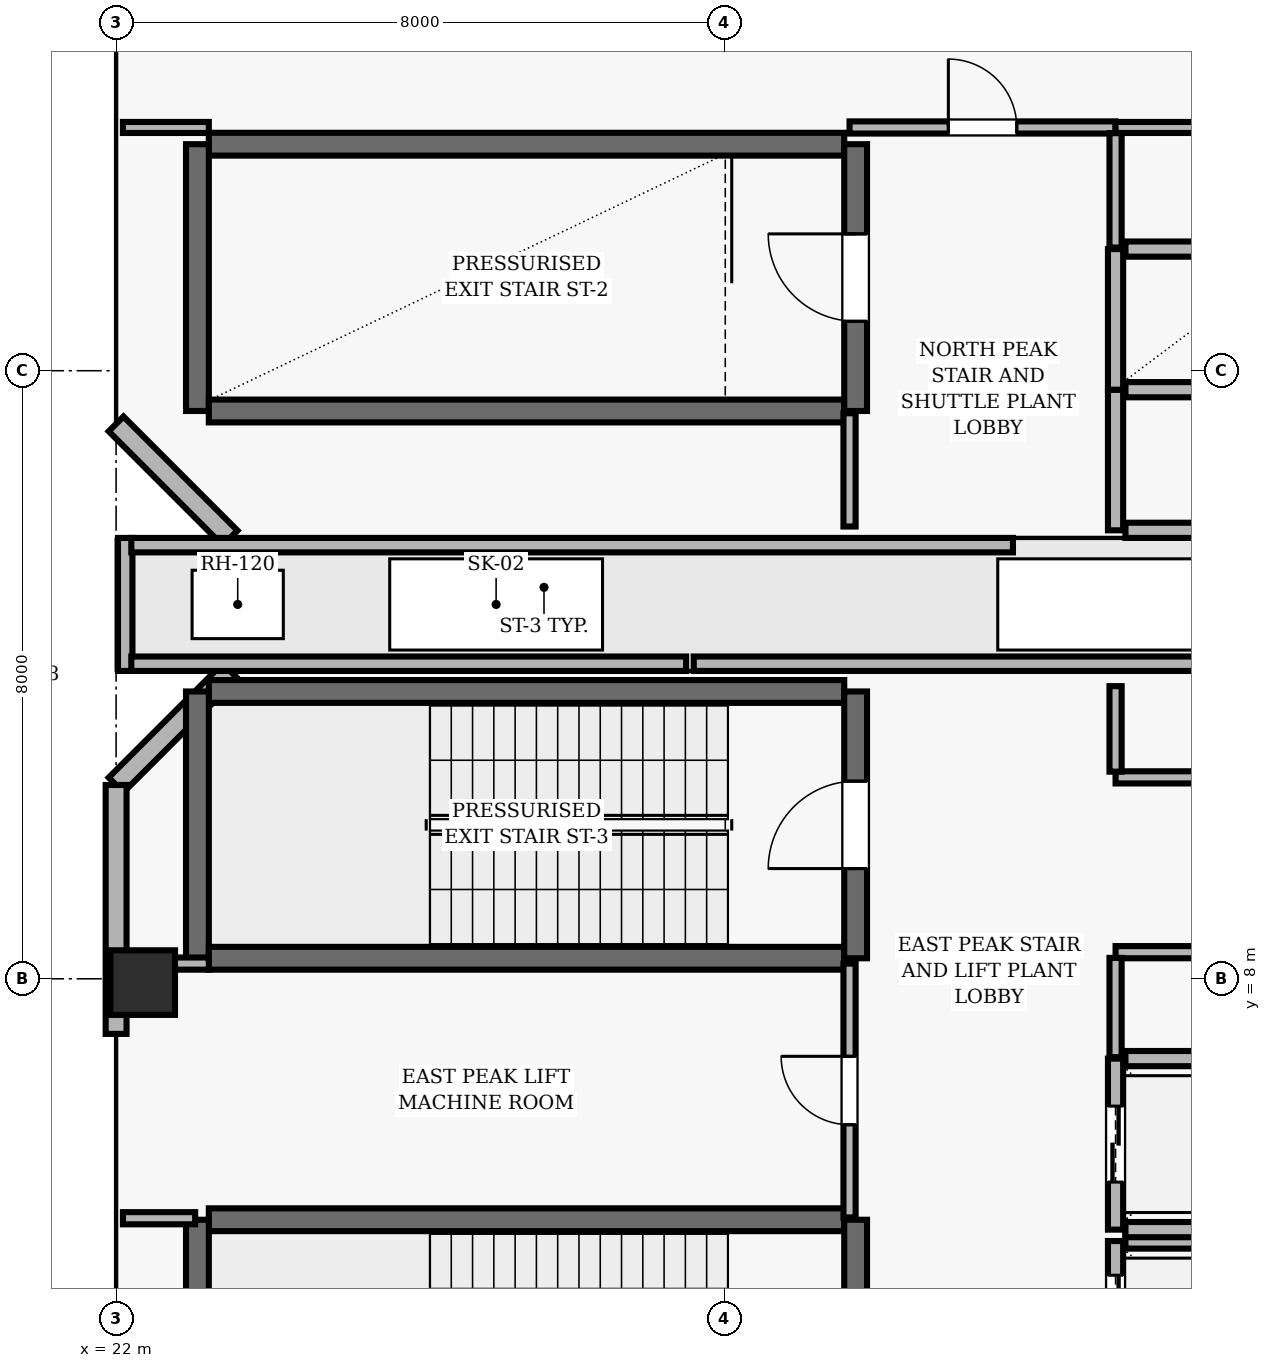
"""IFC4 building model, lengths in metres.
Left out: names, types, materials, properties, quantities, classifications, styles, units other than length and angle.
Written with IfcOpenShell. Run it as: python <this file> out.ifc"""

import sys

from ifc_helpers import new_model, si_unit, direction, frame, frame_2d, origin, origin_2d, place, context, subcontext, project, spatial, rectangle, extrude, element, fill, save


model = new_model("IFC4")
c1 = context("Model", 3, precision=1e-05, world=origin(), true_north=direction((0.0, 1.0)))
c2 = subcontext(c1, "Body", "Model", "MODEL_VIEW")
j1 = project(units=[si_unit("LENGTHUNIT", "METRE"), si_unit("PLANEANGLEUNIT", "RADIAN")], contexts=[c1])
p1 = place(None, origin())
s1 = spatial("IfcSite", under=j1, at=p1, CompositionType="ELEMENT")
p2 = place(p1, origin())
s2 = spatial("IfcBuilding", under=s1, at=p2, CompositionType="ELEMENT")
p3 = place(p2, frame((0.0, 0.0, 316.7)))
s3 = spatial("IfcBuildingStorey", under=s2, at=p3, CompositionType="ELEMENT", Elevation=316.7)
p4 = place(p3, frame((22.35, 7.95, 0.0), z_axis=(0.0, 0.0, 1.0), x_axis=(1.0, 0.0, 0.0)))
e1 = element("IfcColumn", 1, at=p4, inside=s3, PredefinedType="COLUMN", context=c2, shape_type="SweptSolid", body=[
    extrude(rectangle(XDim=0.85, YDim=0.85, at=origin_2d()), origin(), (0.0, 0.0, 1.0), 5.0),
])
p5 = place(p3, frame((23.5, 12.05, 0.0), z_axis=(0.0, 0.0, 1.0), x_axis=(-0.707106781187, -0.707106781187, 0.0)))
e2 = element("IfcWall", 2, at=p5, inside=s3, PredefinedType="SOLIDWALL", context=c2, shape_type="SweptSolid", body=[
    extrude(rectangle(XDim=2.121, YDim=0.275, at=frame_2d((1.061, 0.0))), origin(), (0.0, 0.0, 1.0), 4.74),
])
p6 = place(p3, frame((22.0, 10.55, 0.0), z_axis=(0.0, 0.0, 1.0), x_axis=(0.0, -1.0, 0.0)))
e3 = element("IfcWall", 3, at=p6, inside=s3, PredefinedType="SOLIDWALL", context=c2, shape_type="SweptSolid", body=[
    extrude(rectangle(XDim=3.275, YDim=0.275, at=frame_2d((1.638, 0.0))), origin(), (0.0, 0.0, 1.0), 4.74),
])
p7 = place(p3, frame((22.0, 15.3, 0.0), z_axis=(0.0, 0.0, 1.0), x_axis=(0.707106781187, -0.707106781187, 0.0)))
e4 = element("IfcWall", 4, at=p7, inside=s3, PredefinedType="SOLIDWALL", context=c2, shape_type="SweptSolid", body=[
    extrude(rectangle(XDim=2.121, YDim=0.275, at=frame_2d((1.061, 0.0))), origin(), (0.0, 0.0, 1.0), 4.74),
])
p8 = place(p3, frame((22.12, 12.05, 0.0), z_axis=(0.0, 0.0, 1.0), x_axis=(0.0, 1.0, 0.0)))
e5 = element("IfcWall", 5, at=p8, inside=s3, PredefinedType="PARAPET", context=c2, shape_type="SweptSolid", body=[
    extrude(rectangle(XDim=1.75, YDim=0.19, at=frame_2d((0.875, 0.0))), origin(), (0.0, 0.0, 1.0), 1.3),
])
p9 = place(p3, frame((22.2, 12.145, 0.0), z_axis=(0.0, 0.0, 1.0), x_axis=(1.0, 0.0, 0.0)))
e6 = element("IfcWall", 6, at=p9, inside=s3, PredefinedType="PARAPET", context=c2, shape_type="SweptSolid", body=[
    extrude(rectangle(XDim=7.3, YDim=0.19, at=frame_2d((3.65, 0.0))), origin(), (0.0, 0.0, 1.0), 1.2),
])
p10 = place(p3, frame((29.6, 12.145, 0.0), z_axis=(0.0, 0.0, 1.0), x_axis=(1.0, 0.0, 0.0)))
e7 = element("IfcWall", 7, at=p10, inside=s3, PredefinedType="PARAPET", context=c2, shape_type="SweptSolid", body=[
    extrude(rectangle(XDim=7.9, YDim=0.19, at=frame_2d((3.95, 0.0))), origin(), (0.0, 0.0, 1.0), 1.2),
])
p11 = place(p3, frame((22.2, 13.705, 0.0), z_axis=(0.0, 0.0, 1.0), x_axis=(1.0, 0.0, 0.0)))
e8 = element("IfcWall", 8, at=p11, inside=s3, PredefinedType="PARAPET", context=c2, shape_type="SweptSolid", body=[
    extrude(rectangle(XDim=11.6, YDim=0.19, at=frame_2d((5.8, 0.0))), origin(), (0.0, 0.0, 1.0), 1.2),
])
p12 = place(p3, frame((31.58, 4.83, 0.0), z_axis=(0.0, 0.0, 1.0), x_axis=(-1.0, 0.0, 0.0)))
e9 = element("IfcWall", 9, at=p12, inside=s3, PredefinedType="SHEAR", context=c2, shape_type="SweptSolid", body=[
    extrude(rectangle(XDim=8.36, YDim=0.3, at=frame_2d((4.18, 0.0))), origin(), (0.0, 0.0, 1.0), 4.74),
])
p13 = place(p3, frame((23.07, 4.83, 0.0), z_axis=(0.0, 0.0, 1.0), x_axis=(0.0, -1.0, 0.0)))
e10 = element("IfcWall", 10, at=p13, inside=s3, PredefinedType="SHEAR", context=c2, shape_type="SweptSolid", body=[
    extrude(rectangle(XDim=3.51, YDim=0.3, at=frame_2d((1.755, 0.0))), origin(), (0.0, 0.0, 1.0), 4.74),
])
p14 = place(p3, frame((31.73, 0.96, 0.0), z_axis=(0.0, 0.0, 1.0), x_axis=(0.0, 1.0, 0.0)))
e11 = element("IfcWall", 11, at=p14, inside=s3, PredefinedType="SHEAR", context=c2, shape_type="SweptSolid", body=[
    extrude(rectangle(XDim=3.87, YDim=0.3, at=frame_2d((1.935, 0.0))), origin(), (0.0, 0.0, 1.0), 4.74),
])
p15 = place(p14, frame((1.54, 0.0, 0.0)))
e12 = element("IfcOpeningElement", 12, at=p15, cuts=e11, PredefinedType="OPENING", context=c2, shape_type="SweptSolid", body=[
    extrude(rectangle(XDim=1.15, YDim=2.15, at=frame_2d((0.575, 1.075))), frame((0.0, 0.16, 0.0), z_axis=(0.0, -1.0, 0.0), x_axis=(1.0, 0.0, 0.0)), (0.0, 0.0, 1.0), 0.32),
])
p16 = place(p3, frame((31.58, 18.98, 0.0), z_axis=(0.0, 0.0, 1.0), x_axis=(-1.0, 0.0, 0.0)))
e13 = element("IfcWall", 13, at=p16, inside=s3, PredefinedType="SHEAR", context=c2, shape_type="SweptSolid", body=[
    extrude(rectangle(XDim=8.36, YDim=0.3, at=frame_2d((4.18, 0.0))), origin(), (0.0, 0.0, 1.0), 4.74),
])
p17 = place(p3, frame((23.07, 18.98, 0.0), z_axis=(0.0, 0.0, 1.0), x_axis=(0.0, -1.0, 0.0)))
e14 = element("IfcWall", 14, at=p17, inside=s3, PredefinedType="SHEAR", context=c2, shape_type="SweptSolid", body=[
    extrude(rectangle(XDim=3.51, YDim=0.3, at=frame_2d((1.755, 0.0))), origin(), (0.0, 0.0, 1.0), 4.74),
])
p18 = place(p3, frame((23.22, 15.47, 0.0), z_axis=(0.0, 0.0, 1.0), x_axis=(1.0, 0.0, 0.0)))
e15 = element("IfcWall", 15, at=p18, inside=s3, PredefinedType="SHEAR", context=c2, shape_type="SweptSolid", body=[
    extrude(rectangle(XDim=8.36, YDim=0.3, at=frame_2d((4.18, 0.0))), origin(), (0.0, 0.0, 1.0), 4.74),
])
p19 = place(p3, frame((31.73, 15.47, 0.0), z_axis=(0.0, 0.0, 1.0), x_axis=(0.0, 1.0, 0.0)))
e16 = element("IfcWall", 16, at=p19, inside=s3, PredefinedType="SHEAR", context=c2, shape_type="SweptSolid", body=[
    extrude(rectangle(XDim=3.51, YDim=0.3, at=frame_2d((1.755, 0.0))), origin(), (0.0, 0.0, 1.0), 4.74),
])
p20 = place(p19, frame((1.18, 0.0, 0.0)))
e17 = element("IfcOpeningElement", 17, at=p20, cuts=e16, PredefinedType="OPENING", context=c2, shape_type="SweptSolid", body=[
    extrude(rectangle(XDim=1.15, YDim=2.15, at=frame_2d((0.575, 1.075))), frame((0.0, 0.16, 0.0), z_axis=(0.0, -1.0, 0.0), x_axis=(1.0, 0.0, 0.0)), (0.0, 0.0, 1.0), 0.32),
])
p21 = place(p3, frame((31.58, 11.78, 0.0), z_axis=(0.0, 0.0, 1.0), x_axis=(-1.0, 0.0, 0.0)))
e18 = element("IfcWall", 18, at=p21, inside=s3, PredefinedType="SHEAR", context=c2, shape_type="SweptSolid", body=[
    extrude(rectangle(XDim=8.36, YDim=0.3, at=frame_2d((4.18, 0.0))), origin(), (0.0, 0.0, 1.0), 4.74),
])
p22 = place(p3, frame((23.07, 11.78, 0.0), z_axis=(0.0, 0.0, 1.0), x_axis=(0.0, -1.0, 0.0)))
e19 = element("IfcWall", 19, at=p22, inside=s3, PredefinedType="SHEAR", context=c2, shape_type="SweptSolid", body=[
    extrude(rectangle(XDim=3.51, YDim=0.3, at=frame_2d((1.755, 0.0))), origin(), (0.0, 0.0, 1.0), 4.74),
])
p23 = place(p3, frame((23.22, 8.27, 0.0), z_axis=(0.0, 0.0, 1.0), x_axis=(1.0, 0.0, 0.0)))
e20 = element("IfcWall", 20, at=p23, inside=s3, PredefinedType="SHEAR", context=c2, shape_type="SweptSolid", body=[
    extrude(rectangle(XDim=8.36, YDim=0.3, at=frame_2d((4.18, 0.0))), origin(), (0.0, 0.0, 1.0), 4.74),
])
p24 = place(p3, frame((31.73, 8.27, 0.0), z_axis=(0.0, 0.0, 1.0), x_axis=(0.0, 1.0, 0.0)))
e21 = element("IfcWall", 21, at=p24, inside=s3, PredefinedType="SHEAR", context=c2, shape_type="SweptSolid", body=[
    extrude(rectangle(XDim=3.51, YDim=0.3, at=frame_2d((1.755, 0.0))), origin(), (0.0, 0.0, 1.0), 4.74),
])
p25 = place(p24, frame((1.18, 0.0, 0.0)))
e22 = element("IfcOpeningElement", 22, at=p25, cuts=e21, PredefinedType="OPENING", context=c2, shape_type="SweptSolid", body=[
    extrude(rectangle(XDim=1.15, YDim=2.15, at=frame_2d((0.575, 1.075))), frame((0.0, 0.16, 0.0), z_axis=(0.0, -1.0, 0.0), x_axis=(1.0, 0.0, 0.0)), (0.0, 0.0, 1.0), 0.32),
])
p26 = place(p3, frame((35.15, 4.55, 0.0), z_axis=(0.0, 0.0, 1.0), x_axis=(0.0, -1.0, 0.0)))
e23 = element("IfcWall", 23, at=p26, inside=s3, PredefinedType="SOLIDWALL", context=c2, shape_type="SweptSolid", body=[
    extrude(rectangle(XDim=2.1, YDim=0.2, at=frame_2d((1.05, 0.0))), origin(), (0.0, 0.0, 1.0), 4.74),
])
p27 = place(p26, frame((0.45, 0.0, 0.0)))
e24 = element("IfcOpeningElement", 24, at=p27, cuts=e23, PredefinedType="OPENING", context=c2, shape_type="SweptSolid", body=[
    extrude(rectangle(XDim=1.2, YDim=2.15, at=frame_2d((0.6, 1.075))), frame((0.0, 0.11, 0.0), z_axis=(0.0, -1.0, 0.0), x_axis=(1.0, 0.0, 0.0)), (0.0, 0.0, 1.0), 0.22),
])
p28 = place(p3, frame((37.42, 4.55, 0.0), z_axis=(0.0, 0.0, 1.0), x_axis=(-1.0, 0.0, 0.0)))
e25 = element("IfcWall", 25, at=p28, inside=s3, PredefinedType="SOLIDWALL", context=c2, shape_type="SweptSolid", body=[
    extrude(rectangle(XDim=2.14, YDim=0.2, at=frame_2d((1.07, 0.0))), origin(), (0.0, 0.0, 1.0), 4.74),
])
p29 = place(p3, frame((35.15, 6.95, 0.0), z_axis=(0.0, 0.0, 1.0), x_axis=(0.0, -1.0, 0.0)))
e26 = element("IfcWall", 26, at=p29, inside=s3, PredefinedType="SOLIDWALL", context=c2, shape_type="SweptSolid", body=[
    extrude(rectangle(XDim=2.25, YDim=0.2, at=frame_2d((1.125, 0.0))), origin(), (0.0, 0.0, 1.0), 4.74),
])
p30 = place(p29, frame((0.625, 0.0, 0.0)))
e27 = element("IfcOpeningElement", 27, at=p30, cuts=e26, PredefinedType="OPENING", context=c2, shape_type="SweptSolid", body=[
    extrude(rectangle(XDim=1.0, YDim=2.1, at=frame_2d((0.5, 1.05))), frame((0.0, 0.11, 0.0), z_axis=(0.0, -1.0, 0.0), x_axis=(1.0, 0.0, 0.0)), (0.0, 0.0, 1.0), 0.22),
])
for number, where, z_axis, x_axis in (
    (28, (35.28, 4.7, 0.0), (0.0, 0.0, 1.0), (1.0, 0.0, 0.0)),
    (29, (37.42, 6.95, 0.0), (0.0, 0.0, 1.0), (-1.0, 0.0, 0.0)),
):
    element("IfcWall", number, at=place(p3, frame(where, z_axis=z_axis, x_axis=x_axis)), inside=s3, PredefinedType="SOLIDWALL", context=c2, shape_type="SweptSolid", body=[
        extrude(rectangle(XDim=2.14, YDim=0.2, at=frame_2d((1.07, 0.0))), origin(), (0.0, 0.0, 1.0), 4.74),
    ])
p31 = place(p3, frame((35.15, 15.75, 0.0), z_axis=(0.0, 0.0, 1.0), x_axis=(0.0, -1.0, 0.0)))
e30 = element("IfcWall", 30, at=p31, inside=s3, PredefinedType="SOLIDWALL", context=c2, shape_type="SweptSolid", body=[
    extrude(rectangle(XDim=1.85, YDim=0.2, at=frame_2d((0.925, 0.0))), origin(), (0.0, 0.0, 1.0), 4.74),
])
for number, where, z_axis, x_axis in (
    (31, (35.28, 13.9, 0.0), (0.0, 0.0, 1.0), (1.0, 0.0, 0.0)),
    (32, (37.42, 15.75, 0.0), (0.0, 0.0, 1.0), (-1.0, 0.0, 0.0)),
):
    element("IfcWall", number, at=place(p3, frame(where, z_axis=z_axis, x_axis=x_axis)), inside=s3, PredefinedType="SOLIDWALL", context=c2, shape_type="SweptSolid", body=[
        extrude(rectangle(XDim=2.14, YDim=0.2, at=frame_2d((1.07, 0.0))), origin(), (0.0, 0.0, 1.0), 4.74),
    ])
p32 = place(p3, frame((35.15, 17.6, 0.0), z_axis=(0.0, 0.0, 1.0), x_axis=(0.0, -1.0, 0.0)))
e33 = element("IfcWall", 33, at=p32, inside=s3, PredefinedType="SOLIDWALL", context=c2, shape_type="SweptSolid", body=[
    extrude(rectangle(XDim=1.85, YDim=0.2, at=frame_2d((0.925, 0.0))), origin(), (0.0, 0.0, 1.0), 4.74),
])
p33 = place(p3, frame((37.42, 17.6, 0.0), z_axis=(0.0, 0.0, 1.0), x_axis=(-1.0, 0.0, 0.0)))
e34 = element("IfcWall", 34, at=p33, inside=s3, PredefinedType="SOLIDWALL", context=c2, shape_type="SweptSolid", body=[
    extrude(rectangle(XDim=2.14, YDim=0.2, at=frame_2d((1.07, 0.0))), origin(), (0.0, 0.0, 1.0), 4.74),
])
p34 = place(p3, frame((22.09, 4.85, 0.0), z_axis=(0.0, 0.0, 1.0), x_axis=(1.0, 0.0, 0.0)))
e35 = element("IfcWall", 35, at=p34, inside=s3, PredefinedType="PARTITIONING", context=c2, shape_type="SweptSolid", body=[
    extrude(rectangle(XDim=0.95, YDim=0.16, at=frame_2d((0.475, 0.0))), origin(), (0.0, 0.0, 1.0), 4.74),
])
p35 = place(p3, frame((22.09, 19.2, 0.0), z_axis=(0.0, 0.0, 1.0), x_axis=(1.0, 0.0, 0.0)))
e36 = element("IfcWall", 36, at=p35, inside=s3, PredefinedType="PARTITIONING", context=c2, shape_type="SweptSolid", body=[
    extrude(rectangle(XDim=1.13, YDim=0.145, at=frame_2d((0.565, 0.0))), origin(), (0.0, 0.0, 1.0), 4.74),
])
p36 = place(p3, frame((23.22, 8.2, 0.0), z_axis=(0.0, 0.0, 1.0), x_axis=(-1.0, 0.0, 0.0)))
e37 = element("IfcWall", 37, at=p36, inside=s3, PredefinedType="PARTITIONING", context=c2, shape_type="SweptSolid", body=[
    extrude(rectangle(XDim=1.087, YDim=0.16, at=frame_2d((0.543, 0.0))), origin(), (0.0, 0.0, 1.0), 4.277),
])
p37 = place(p3, frame((31.65, 19.2, 0.0), z_axis=(0.0, 0.0, 1.0), x_axis=(1.0, 0.0, 0.0)))
e38 = element("IfcWall", 38, at=p37, inside=s3, PredefinedType="PARTITIONING", context=c2, shape_type="SweptSolid", body=[
    extrude(rectangle(XDim=3.5, YDim=0.16, at=frame_2d((1.75, 0.0))), origin(), (0.0, 0.0, 1.0), 4.74),
])
p38 = place(p37, frame((1.3, 0.0, 0.0)))
e39 = element("IfcOpeningElement", 39, at=p38, cuts=e38, PredefinedType="OPENING", context=c2, shape_type="SweptSolid", body=[
    extrude(rectangle(XDim=0.9, YDim=2.1, at=frame_2d((0.45, 1.05))), frame((0.0, 0.09, 0.0), z_axis=(0.0, -1.0, 0.0), x_axis=(1.0, 0.0, 0.0)), (0.0, 0.0, 1.0), 0.18),
])
p39 = place(p3, frame((35.15, 8.35, 0.0), z_axis=(0.0, 0.0, 1.0), x_axis=(1.0, 0.0, 0.0)))
e40 = element("IfcWall", 40, at=p39, inside=s3, PredefinedType="PARTITIONING", context=c2, shape_type="SweptSolid", body=[
    extrude(rectangle(XDim=2.9, YDim=0.16, at=frame_2d((1.45, 0.0))), origin(), (0.0, 0.0, 1.0), 4.277),
])
p40 = place(p3, frame((35.15, 19.2, 0.0), z_axis=(0.0, 0.0, 1.0), x_axis=(1.0, 0.0, 0.0)))
e41 = element("IfcWall", 41, at=p40, inside=s3, PredefinedType="PARTITIONING", context=c2, shape_type="SweptSolid", body=[
    extrude(rectangle(XDim=2.76, YDim=0.145, at=frame_2d((1.38, 0.0))), origin(), (0.0, 0.0, 1.0), 4.74),
])
p41 = place(p3, frame((59.513, 10.65, 0.0), z_axis=(0.0, 0.0, 1.0), x_axis=(-1.0, 0.0, 0.0)))
e42 = element("IfcWall", 42, at=p41, inside=s3, PredefinedType="PARTITIONING", context=c2, shape_type="SweptSolid", body=[
    extrude(rectangle(XDim=24.363, YDim=0.16, at=frame_2d((12.182, 0.0))), origin(), (0.0, 0.0, 1.0), 4.74),
])
p42 = place(p3, frame((31.65, 4.86, 0.0), z_axis=(0.0, 0.0, 1.0), x_axis=(0.0, 1.0, 0.0)))
e43 = element("IfcWall", 43, at=p42, inside=s3, PredefinedType="PARTITIONING", context=c2, shape_type="SweptSolid", body=[
    extrude(rectangle(XDim=3.34, YDim=0.16, at=frame_2d((1.67, 0.0))), origin(), (0.0, 0.0, 1.0), 4.74),
])
p43 = place(p42, frame((1.22, 0.0, 0.0)))
e44 = element("IfcOpeningElement", 44, at=p43, cuts=e43, PredefinedType="OPENING", context=c2, shape_type="SweptSolid", body=[
    extrude(rectangle(XDim=0.9, YDim=2.1, at=frame_2d((0.45, 1.05))), frame((0.0, 0.09, 0.0), z_axis=(0.0, -1.0, 0.0), x_axis=(1.0, 0.0, 0.0)), (0.0, 0.0, 1.0), 0.18),
])
p44 = place(p3, frame((31.65, 15.44, 0.0), z_axis=(0.0, 0.0, 1.0), x_axis=(0.0, -1.0, 0.0)))
e45 = element("IfcWall", 45, at=p44, inside=s3, PredefinedType="PARTITIONING", context=c2, shape_type="SweptSolid", body=[
    extrude(rectangle(XDim=1.49, YDim=0.16, at=frame_2d((0.745, 0.0))), origin(), (0.0, 0.0, 1.0), 4.74),
])
p45 = place(p3, frame((35.15, 6.97, 0.0), z_axis=(0.0, 0.0, 1.0), x_axis=(0.0, 1.0, 0.0)))
e46 = element("IfcWall", 46, at=p45, inside=s3, PredefinedType="PARTITIONING", context=c2, shape_type="SweptSolid", body=[
    extrude(rectangle(XDim=1.305, YDim=0.16, at=frame_2d((0.652, 0.0))), origin(), (0.0, 0.0, 1.0), 4.74),
])
p46 = place(p3, frame((35.15, 10.725, 0.0), z_axis=(0.0, 0.0, 1.0), x_axis=(0.0, 1.0, 0.0)))
e47 = element("IfcWall", 47, at=p46, inside=s3, PredefinedType="PARTITIONING", context=c2, shape_type="SweptSolid", body=[
    extrude(rectangle(XDim=1.125, YDim=0.16, at=frame_2d((0.562, 0.0))), origin(), (0.0, 0.0, 1.0), 4.74),
])
p47 = place(p3, frame((35.15, 17.62, 0.0), z_axis=(0.0, 0.0, 1.0), x_axis=(0.0, 1.0, 0.0)))
e48 = element("IfcWall", 48, at=p47, inside=s3, PredefinedType="PARTITIONING", context=c2, shape_type="SweptSolid", body=[
    extrude(rectangle(XDim=1.505, YDim=0.16, at=frame_2d((0.752, 0.0))), origin(), (0.0, 0.0, 1.0), 4.74),
])
p48 = place(p3, frame((0.0, 0.0, -0.26)))
p49 = place(p48, frame((27.0, 12.925, 0.0)))
p50 = place(p49, frame((0.0, 0.0, 0.21)))
e49 = element("IfcWindow", 49, at=p50, inside=s3, PartitioningType="SINGLE_PANEL", PredefinedType="SKYLIGHT", context=c2, shape_type="SweptSolid", body=[
    extrude(rectangle(XDim=2.8, YDim=1.2, at=origin_2d()), origin(), (0.0, 0.0, 1.0), 0.05),
])
p51 = place(p48, frame((35.0, 12.925, 0.0)))
p52 = place(p51, frame((0.0, 0.0, 0.21)))
e50 = element("IfcWindow", 50, at=p52, inside=s3, PartitioningType="SINGLE_PANEL", PredefinedType="SKYLIGHT", context=c2, shape_type="SweptSolid", body=[
    extrude(rectangle(XDim=2.8, YDim=1.2, at=origin_2d()), origin(), (0.0, 0.0, 1.0), 0.05),
])
p53 = place(p48, frame((23.6, 12.925, 0.0)))
p54 = place(p53, frame((0.0, 0.0, 0.21)))
e51 = element("IfcDoor", 51, at=p54, inside=s3, OperationType="SINGLE_SWING_LEFT", PredefinedType="TRAPDOOR", context=c2, shape_type="SweptSolid", body=[
    extrude(rectangle(XDim=1.2, YDim=0.9, at=origin_2d()), origin(), (0.0, 0.0, 1.0), 0.05),
])
p55 = place(p20, origin())
e52 = element("IfcDoor", 52, at=p55, inside=s3, OperationType="SINGLE_SWING_RIGHT", PredefinedType="DOOR", context=c2, shape_type="SweptSolid", body=[
    extrude(rectangle(XDim=1.15, YDim=2.15, at=frame_2d((0.575, 1.075))), frame((0.0, 0.025, 0.0), z_axis=(0.0, -1.0, 0.0), x_axis=(1.0, 0.0, 0.0)), (0.0, 0.0, 1.0), 0.05),
])
fill(e17, e52)
p56 = place(p25, origin())
e53 = element("IfcDoor", 53, at=p56, inside=s3, OperationType="SINGLE_SWING_LEFT", PredefinedType="DOOR", context=c2, shape_type="SweptSolid", body=[
    extrude(rectangle(XDim=1.15, YDim=2.15, at=frame_2d((0.575, 1.075))), frame((0.0, 0.025, 0.0), z_axis=(0.0, -1.0, 0.0), x_axis=(1.0, 0.0, 0.0)), (0.0, 0.0, 1.0), 0.05),
])
fill(e22, e53)
p57 = place(p27, origin())
e54 = element("IfcDoor", 54, at=p57, inside=s3, OperationType="DOUBLE_DOOR_SLIDING", PredefinedType="DOOR", context=c2, shape_type="SweptSolid", body=[
    extrude(rectangle(XDim=1.2, YDim=2.15, at=frame_2d((0.6, 1.075))), frame((0.0, 0.025, 0.0), z_axis=(0.0, -1.0, 0.0), x_axis=(1.0, 0.0, 0.0)), (0.0, 0.0, 1.0), 0.05),
])
fill(e24, e54)
p58 = place(p30, origin())
e55 = element("IfcDoor", 55, at=p58, inside=s3, OperationType="DOUBLE_DOOR_SLIDING", PredefinedType="DOOR", context=c2, shape_type="SweptSolid", body=[
    extrude(rectangle(XDim=1.0, YDim=2.1, at=frame_2d((0.5, 1.05))), frame((0.0, 0.025, 0.0), z_axis=(0.0, -1.0, 0.0), x_axis=(1.0, 0.0, 0.0)), (0.0, 0.0, 1.0), 0.05),
])
fill(e27, e55)
p59 = place(p43, origin())
e56 = element("IfcDoor", 56, at=p59, inside=s3, OperationType="SINGLE_SWING_RIGHT", PredefinedType="DOOR", context=c2, shape_type="SweptSolid", body=[
    extrude(rectangle(XDim=0.9, YDim=2.1, at=frame_2d((0.45, 1.05))), frame((0.0, 0.025, 0.0), z_axis=(0.0, -1.0, 0.0), x_axis=(1.0, 0.0, 0.0)), (0.0, 0.0, 1.0), 0.05),
])
fill(e44, e56)
p60 = place(p38, origin())
e57 = element("IfcDoor", 57, at=p60, inside=s3, OperationType="SINGLE_SWING_LEFT", PredefinedType="DOOR", context=c2, shape_type="SweptSolid", body=[
    extrude(rectangle(XDim=0.9, YDim=2.1, at=frame_2d((0.45, 1.05))), frame((0.0, 0.025, 0.0), z_axis=(0.0, -1.0, 0.0), x_axis=(1.0, 0.0, 0.0)), (0.0, 0.0, 1.0), 0.05),
])
fill(e39, e57)
save(model, sys.argv[1])
